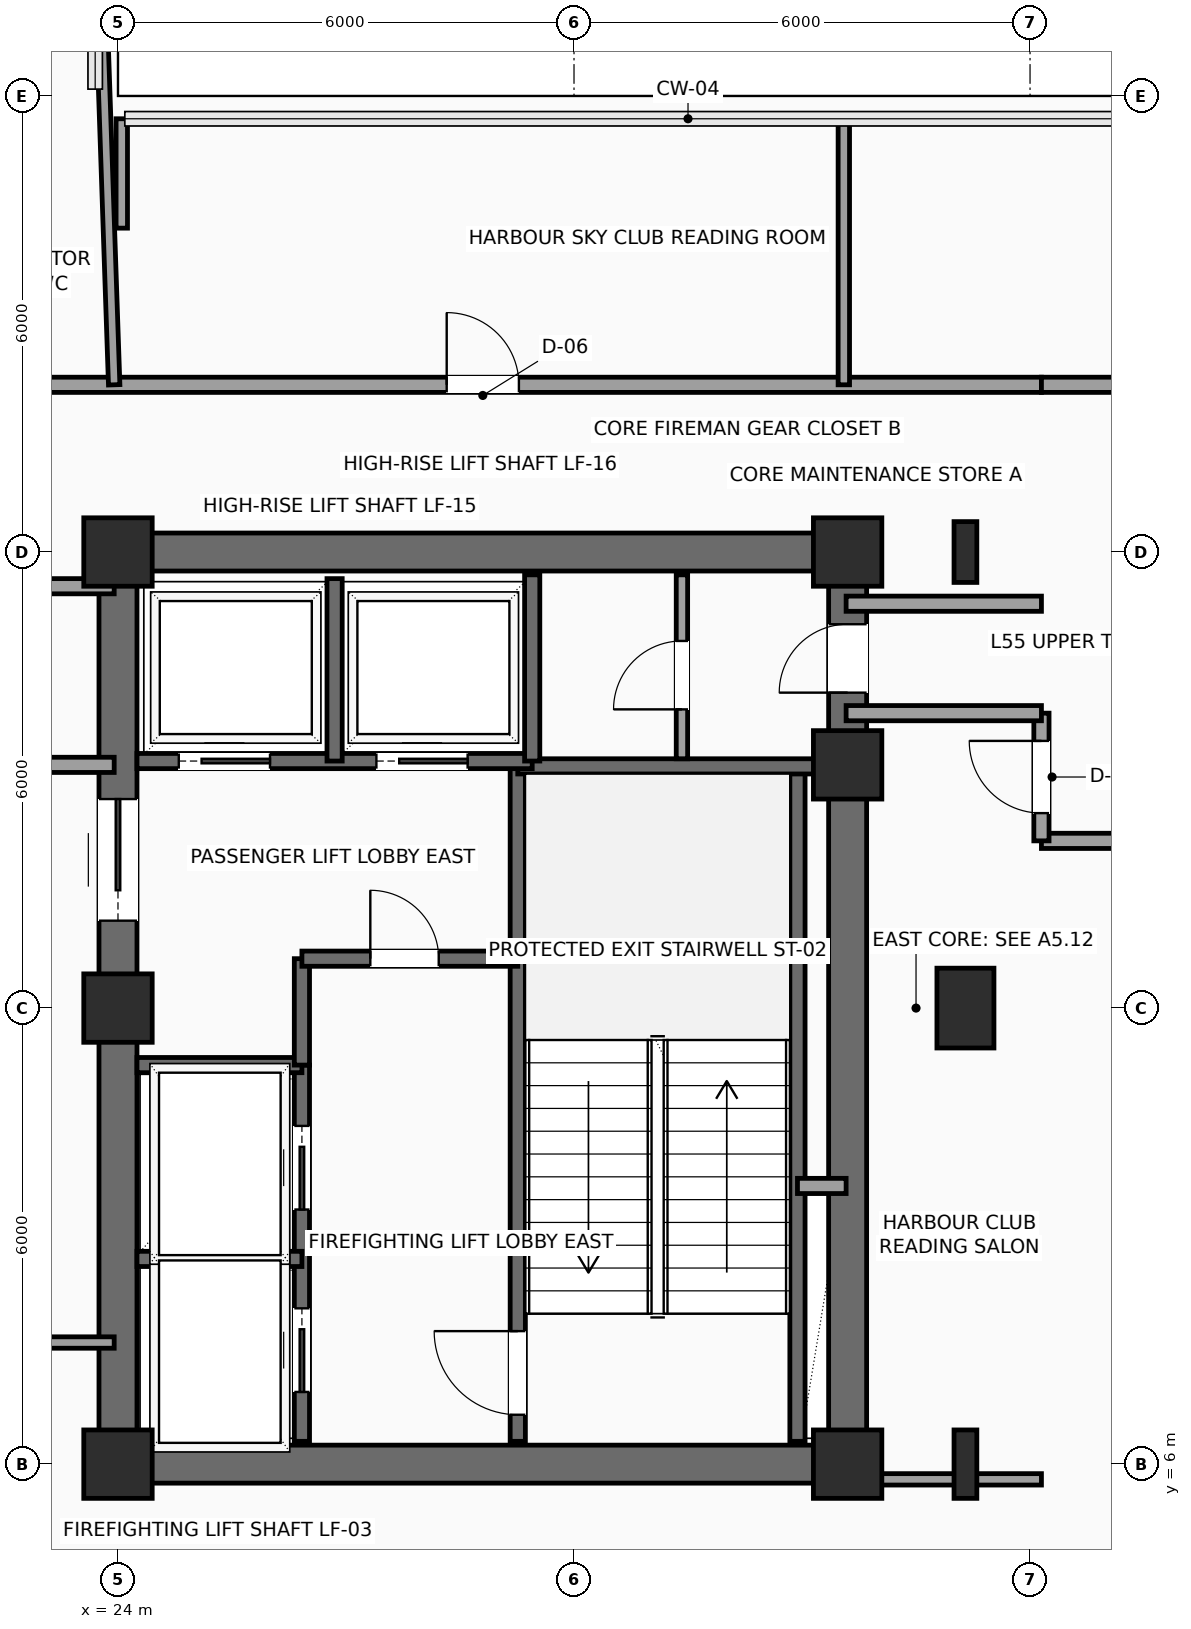
"""IFC4 building model, lengths in metres.
Left out: names, types, materials, properties, quantities, classifications, styles, units other than length and angle.
Written with IfcOpenShell. Run it as: python <this file> out.ifc"""

import sys

from ifc_helpers import new_model, si_unit, direction, frame, frame_2d, origin, origin_2d, place, context, subcontext, project, spatial, rectangle, i_section, extrude, element, fill, save


model = new_model("IFC4")
c1 = context("Model", 3, precision=1e-05, world=origin(), true_north=direction((0.0, 1.0)))
c2 = subcontext(c1, "Body", "Model", "MODEL_VIEW")
j1 = project(units=[si_unit("LENGTHUNIT", "METRE"), si_unit("PLANEANGLEUNIT", "RADIAN")], contexts=[c1])
p1 = place(None, origin())
s1 = spatial("IfcSite", under=j1, at=p1, CompositionType="ELEMENT")
p2 = place(p1, origin())
s2 = spatial("IfcBuilding", under=s1, at=p2, CompositionType="ELEMENT")
p3 = place(p2, frame((0.0, 0.0, 223.65)))
s3 = spatial("IfcBuildingStorey", under=s2, at=p3, CompositionType="ELEMENT", Elevation=223.65)
for number, where, z_axis, x_axis in (
    (1, (24.0, 6.0, 0.0), (0.0, 0.0, 1.0), (1.0, 0.0, 0.0)),
    (2, (24.0, 12.0, 0.0), (0.0, 0.0, 1.0), (1.0, 0.0, 0.0)),
    (3, (24.0, 18.0, 0.0), (0.0, 0.0, 1.0), (1.0, 0.0, 0.0)),
    (4, (33.6, 6.0, 0.0), (0.0, 0.0, 1.0), (1.0, 0.0, 0.0)),
    (5, (33.6, 15.2, 0.0), (0.0, 0.0, 1.0), (1.0, 0.0, 0.0)),
    (6, (33.6, 18.0, 0.0), (0.0, 0.0, 1.0), (1.0, 0.0, 0.0)),
):
    element("IfcColumn", number, at=place(p3, frame(where, z_axis=z_axis, x_axis=x_axis)), inside=s3, PredefinedType="COLUMN", context=c2, shape_type="SweptSolid", body=[
        extrude(rectangle(XDim=0.9, YDim=0.9, at=origin_2d()), origin(), (0.0, 0.0, 1.0), 3.75),
    ])
p4 = place(p3, frame((35.15, 6.0, 0.0), z_axis=(0.0, 0.0, 1.0), x_axis=(1.0, 0.0, 0.0)))
e7 = element("IfcColumn", 7, at=p4, inside=s3, PredefinedType="COLUMN", context=c2, shape_type="SweptSolid", body=[
    extrude(i_section(OverallWidth=0.3, OverallDepth=0.9, WebThickness=0.019, FlangeThickness=0.035, FilletRadius=0.03, at=origin_2d()), origin(), (0.0, 0.0, 1.0), 3.75),
])
p5 = place(p3, frame((35.15, 12.0, 0.0), z_axis=(0.0, 0.0, 1.0), x_axis=(1.0, 0.0, 0.0)))
e8 = element("IfcColumn", 8, at=p5, inside=s3, PredefinedType="COLUMN", context=c2, shape_type="SweptSolid", body=[
    extrude(rectangle(XDim=0.75, YDim=1.05, at=origin_2d()), origin(), (0.0, 0.0, 1.0), 3.75),
])
p6 = place(p3, frame((35.15, 18.0, 0.0), z_axis=(0.0, 0.0, 1.0), x_axis=(1.0, 0.0, 0.0)))
e9 = element("IfcColumn", 9, at=p6, inside=s3, PredefinedType="COLUMN", context=c2, shape_type="SweptSolid", body=[
    extrude(i_section(OverallWidth=0.3, OverallDepth=0.8, WebThickness=0.018, FlangeThickness=0.033, FilletRadius=0.03, at=origin_2d()), origin(), (0.0, 0.0, 1.0), 3.75),
])
for number, where, z_axis, x_axis in (
    (10, (24.0, 6.0, 0.0), (0.0, 0.0, 1.0), (1.0, 0.0, 0.0)),
    (11, (24.0, 18.0, 0.0), (0.0, 0.0, 1.0), (1.0, 0.0, 0.0)),
):
    element("IfcWall", number, at=place(p3, frame(where, z_axis=z_axis, x_axis=x_axis)), inside=s3, PredefinedType="SHEAR", context=c2, shape_type="SweptSolid", body=[
        extrude(rectangle(XDim=9.6, YDim=0.5, at=frame_2d((4.8, 0.0))), origin(), (0.0, 0.0, 1.0), 3.54),
    ])
p7 = place(p3, frame((24.0, 6.0, 0.0), z_axis=(0.0, 0.0, 1.0), x_axis=(0.0, 1.0, 0.0)))
e12 = element("IfcWall", 12, at=p7, inside=s3, PredefinedType="SHEAR", context=c2, shape_type="SweptSolid", body=[
    extrude(rectangle(XDim=12.0, YDim=0.5, at=frame_2d((6.0, 0.0))), origin(), (0.0, 0.0, 1.0), 3.54),
])
p8 = place(p7, frame((7.15, 0.0, 0.0)))
e13 = element("IfcOpeningElement", 13, at=p8, cuts=e12, PredefinedType="OPENING", context=c2, shape_type="SweptSolid", body=[
    extrude(rectangle(XDim=1.6, YDim=2.3, at=frame_2d((0.8, 1.15))), frame((0.0, 0.26, 0.0), z_axis=(0.0, -1.0, 0.0), x_axis=(1.0, 0.0, 0.0)), (0.0, 0.0, 1.0), 0.52),
])
p9 = place(p3, frame((33.6, 6.0, 0.0), z_axis=(0.0, 0.0, 1.0), x_axis=(0.0, 1.0, 0.0)))
e14 = element("IfcWall", 14, at=p9, inside=s3, PredefinedType="SHEAR", context=c2, shape_type="SweptSolid", body=[
    extrude(rectangle(XDim=12.0, YDim=0.5, at=frame_2d((6.0, 0.0))), origin(), (0.0, 0.0, 1.0), 3.54),
])
p10 = place(p9, frame((10.15, 0.0, 0.0)))
e15 = element("IfcOpeningElement", 15, at=p10, cuts=e14, PredefinedType="OPENING", context=c2, shape_type="SweptSolid", body=[
    extrude(rectangle(XDim=0.9, YDim=2.15, at=frame_2d((0.45, 1.075))), frame((0.0, 0.26, 0.0), z_axis=(0.0, -1.0, 0.0), x_axis=(1.0, 0.0, 0.0)), (0.0, 0.0, 1.0), 0.52),
])
p11 = place(p3, frame((29.26, 6.3, 0.0), z_axis=(0.0, 0.0, 1.0), x_axis=(0.0, 1.0, 0.0)))
e16 = element("IfcWall", 16, at=p11, inside=s3, PredefinedType="SHEAR", context=c2, shape_type="SweptSolid", body=[
    extrude(rectangle(XDim=8.88, YDim=0.2, at=frame_2d((4.44, 0.0))), origin(), (0.0, 0.0, 1.0), 3.54),
])
p12 = place(p11, frame((0.35, 0.0, 0.0)))
e17 = element("IfcOpeningElement", 17, at=p12, cuts=e16, PredefinedType="OPENING", context=c2, shape_type="SweptSolid", body=[
    extrude(rectangle(XDim=1.1, YDim=2.2, at=frame_2d((0.55, 1.1))), frame((0.0, 0.11, 0.0), z_axis=(0.0, -1.0, 0.0), x_axis=(1.0, 0.0, 0.0)), (0.0, 0.0, 1.0), 0.22),
])
p13 = place(p3, frame((32.94, 6.3, 0.0), z_axis=(0.0, 0.0, 1.0), x_axis=(0.0, 1.0, 0.0)))
e18 = element("IfcWall", 18, at=p13, inside=s3, PredefinedType="SHEAR", context=c2, shape_type="SweptSolid", body=[
    extrude(rectangle(XDim=8.88, YDim=0.2, at=frame_2d((4.44, 0.0))), origin(), (0.0, 0.0, 1.0), 3.54),
])
p14 = place(p3, frame((29.26, 15.18, 0.0), z_axis=(0.0, 0.0, 1.0), x_axis=(1.0, 0.0, 0.0)))
e19 = element("IfcWall", 19, at=p14, inside=s3, PredefinedType="SHEAR", context=c2, shape_type="SweptSolid", body=[
    extrude(rectangle(XDim=4.04, YDim=0.2, at=frame_2d((2.02, 0.0))), origin(), (0.0, 0.0, 1.0), 3.54),
])
p15 = place(p3, frame((26.42, 6.3, 0.0), z_axis=(0.0, 0.0, 1.0), x_axis=(0.0, 1.0, 0.0)))
e20 = element("IfcWall", 20, at=p15, inside=s3, PredefinedType="SHEAR", context=c2, shape_type="SweptSolid", body=[
    extrude(rectangle(XDim=4.95, YDim=0.2, at=frame_2d((2.475, 0.0))), origin(), (0.0, 0.0, 1.0), 3.54),
])
p16 = place(p15, frame((0.65, 0.0, 0.0)))
e21 = element("IfcOpeningElement", 21, at=p16, cuts=e20, PredefinedType="OPENING", context=c2, shape_type="SweptSolid", body=[
    extrude(rectangle(XDim=1.1, YDim=2.2, at=frame_2d((0.55, 1.1))), frame((0.0, 0.11, 0.0), z_axis=(0.0, -1.0, 0.0), x_axis=(1.0, 0.0, 0.0)), (0.0, 0.0, 1.0), 0.22),
])
p17 = place(p15, frame((3.05, 0.0, 0.0)))
e22 = element("IfcOpeningElement", 22, at=p17, cuts=e20, PredefinedType="OPENING", context=c2, shape_type="SweptSolid", body=[
    extrude(rectangle(XDim=1.1, YDim=2.2, at=frame_2d((0.55, 1.1))), frame((0.0, 0.11, 0.0), z_axis=(0.0, -1.0, 0.0), x_axis=(1.0, 0.0, 0.0)), (0.0, 0.0, 1.0), 0.22),
])
for number, where, z_axis, x_axis in (
    (23, (24.25, 8.7, 0.0), (0.0, 0.0, 1.0), (1.0, 0.0, 0.0)),
    (24, (24.25, 11.25, 0.0), (0.0, 0.0, 1.0), (1.0, 0.0, 0.0)),
):
    element("IfcWall", number, at=place(p3, frame(where, z_axis=z_axis, x_axis=x_axis)), inside=s3, PredefinedType="SHEAR", context=c2, shape_type="SweptSolid", body=[
        extrude(rectangle(XDim=2.17, YDim=0.2, at=frame_2d((1.085, 0.0))), origin(), (0.0, 0.0, 1.0), 3.54),
    ])
p18 = place(p3, frame((26.42, 11.25, 0.0), z_axis=(0.0, 0.0, 1.0), x_axis=(0.0, 1.0, 0.0)))
e25 = element("IfcWall", 25, at=p18, inside=s3, PredefinedType="SHEAR", context=c2, shape_type="SweptSolid", body=[
    extrude(rectangle(XDim=1.4, YDim=0.2, at=frame_2d((0.7, 0.0))), origin(), (0.0, 0.0, 1.0), 3.54),
])
p19 = place(p3, frame((26.42, 12.65, 0.0), z_axis=(0.0, 0.0, 1.0), x_axis=(1.0, 0.0, 0.0)))
e26 = element("IfcWall", 26, at=p19, inside=s3, PredefinedType="SHEAR", context=c2, shape_type="SweptSolid", body=[
    extrude(rectangle(XDim=2.84, YDim=0.2, at=frame_2d((1.42, 0.0))), origin(), (0.0, 0.0, 1.0), 3.54),
])
p20 = place(p19, frame((0.9, 0.0, 0.0)))
e27 = element("IfcOpeningElement", 27, at=p20, cuts=e26, PredefinedType="OPENING", context=c2, shape_type="SweptSolid", body=[
    extrude(rectangle(XDim=0.9, YDim=2.15, at=frame_2d((0.45, 1.075))), frame((0.0, 0.11, 0.0), z_axis=(0.0, -1.0, 0.0), x_axis=(1.0, 0.0, 0.0)), (0.0, 0.0, 1.0), 0.22),
])
p21 = place(p3, frame((32.94, 9.66, 0.0), z_axis=(0.0, 0.0, 1.0), x_axis=(1.0, 0.0, 0.0)))
e28 = element("IfcWall", 28, at=p21, inside=s3, PredefinedType="SOLIDWALL", context=c2, shape_type="SweptSolid", body=[
    extrude(rectangle(XDim=0.64, YDim=0.2, at=frame_2d((0.32, 0.0))), origin(), (0.0, 0.0, 1.0), 3.54),
])
p22 = place(p3, frame((24.25, 15.25, 0.0), z_axis=(0.0, 0.0, 1.0), x_axis=(1.0, 0.0, 0.0)))
e29 = element("IfcWall", 29, at=p22, inside=s3, PredefinedType="SHEAR", context=c2, shape_type="SweptSolid", body=[
    extrude(rectangle(XDim=5.2, YDim=0.2, at=frame_2d((2.6, 0.0))), origin(), (0.0, 0.0, 1.0), 3.54),
])
p23 = place(p22, frame((0.55, 0.0, 0.0)))
e30 = element("IfcOpeningElement", 30, at=p23, cuts=e29, PredefinedType="OPENING", context=c2, shape_type="SweptSolid", body=[
    extrude(rectangle(XDim=1.2, YDim=2.2, at=frame_2d((0.6, 1.1))), frame((0.0, 0.11, 0.0), z_axis=(0.0, -1.0, 0.0), x_axis=(1.0, 0.0, 0.0)), (0.0, 0.0, 1.0), 0.22),
])
p24 = place(p22, frame((3.15, 0.0, 0.0)))
e31 = element("IfcOpeningElement", 31, at=p24, cuts=e29, PredefinedType="OPENING", context=c2, shape_type="SweptSolid", body=[
    extrude(rectangle(XDim=1.2, YDim=2.2, at=frame_2d((0.6, 1.1))), frame((0.0, 0.11, 0.0), z_axis=(0.0, -1.0, 0.0), x_axis=(1.0, 0.0, 0.0)), (0.0, 0.0, 1.0), 0.22),
])
p25 = place(p3, frame((26.85, 15.25, 0.0), z_axis=(0.0, 0.0, 1.0), x_axis=(0.0, 1.0, 0.0)))
e32 = element("IfcWall", 32, at=p25, inside=s3, PredefinedType="SHEAR", context=c2, shape_type="SweptSolid", body=[
    extrude(rectangle(XDim=2.4, YDim=0.2, at=frame_2d((1.2, 0.0))), origin(), (0.0, 0.0, 1.0), 3.54),
])
p26 = place(p3, frame((29.45, 15.25, 0.0), z_axis=(0.0, 0.0, 1.0), x_axis=(0.0, 1.0, 0.0)))
e33 = element("IfcWall", 33, at=p26, inside=s3, PredefinedType="SHEAR", context=c2, shape_type="SweptSolid", body=[
    extrude(rectangle(XDim=2.45, YDim=0.2, at=frame_2d((1.225, 0.0))), origin(), (0.0, 0.0, 1.0), 3.54),
])
p27 = place(p3, frame((31.42, 15.28, 0.0), z_axis=(0.0, 0.0, 1.0), x_axis=(0.0, 1.0, 0.0)))
e34 = element("IfcWall", 34, at=p27, inside=s3, PredefinedType="PARTITIONING", context=c2, shape_type="SweptSolid", body=[
    extrude(rectangle(XDim=2.42, YDim=0.15, at=frame_2d((1.21, 0.0))), origin(), (0.0, 0.0, 1.0), 3.54),
])
p28 = place(p27, frame((0.65, 0.0, 0.0)))
e35 = element("IfcOpeningElement", 35, at=p28, cuts=e34, PredefinedType="OPENING", context=c2, shape_type="SweptSolid", body=[
    extrude(rectangle(XDim=0.9, YDim=2.15, at=frame_2d((0.45, 1.075))), frame((0.0, 0.085, 0.0), z_axis=(0.0, -1.0, 0.0), x_axis=(1.0, 0.0, 0.0)), (0.0, 0.0, 1.0), 0.17),
])
p29 = place(p3, frame((20.45, 20.2, 0.0), z_axis=(0.0, 0.0, 1.0), x_axis=(1.0, 0.0, 0.0)))
e36 = element("IfcWall", 36, at=p29, inside=s3, PredefinedType="SOLIDWALL", context=c2, shape_type="SweptSolid", body=[
    extrude(rectangle(XDim=15.7, YDim=0.2, at=frame_2d((7.85, 0.0))), origin(), (0.0, 0.0, 1.0), 3.54),
])
p30 = place(p29, frame((7.875, 0.0, 0.0)))
e37 = element("IfcOpeningElement", 37, at=p30, cuts=e36, PredefinedType="OPENING", context=c2, shape_type="SweptSolid", body=[
    extrude(rectangle(XDim=0.95, YDim=2.15, at=frame_2d((0.475, 1.075))), frame((0.0, 0.11, 0.0), z_axis=(0.0, -1.0, 0.0), x_axis=(1.0, 0.0, 0.0)), (0.0, 0.0, 1.0), 0.22),
])
for number, where, z_axis, x_axis in (
    (38, (36.15, 20.2, 0.0), (0.0, 0.0, 1.0), (1.0, 0.0, 0.0)),
    (39, (38.55, 14.2, 0.0), (0.0, 0.0, 1.0), (-1.0, 0.0, 0.0)),
):
    element("IfcWall", number, at=place(p3, frame(where, z_axis=z_axis, x_axis=x_axis)), inside=s3, PredefinedType="SOLIDWALL", context=c2, shape_type="SweptSolid", body=[
        extrude(rectangle(XDim=2.4, YDim=0.2, at=frame_2d((1.2, 0.0))), origin(), (0.0, 0.0, 1.0), 3.54),
    ])
p31 = place(p3, frame((36.15, 14.2, 0.0), z_axis=(0.0, 0.0, 1.0), x_axis=(0.0, 1.0, 0.0)))
e40 = element("IfcWall", 40, at=p31, inside=s3, PredefinedType="SOLIDWALL", context=c2, shape_type="SweptSolid", body=[
    extrude(rectangle(XDim=1.68, YDim=0.2, at=frame_2d((0.84, 0.0))), origin(), (0.0, 0.0, 1.0), 3.54),
])
p32 = place(p31, frame((0.365, 0.0, 0.0)))
e41 = element("IfcOpeningElement", 41, at=p32, cuts=e40, PredefinedType="OPENING", context=c2, shape_type="SweptSolid", body=[
    extrude(rectangle(XDim=0.95, YDim=2.15, at=frame_2d((0.475, 1.075))), frame((0.0, 0.11, 0.0), z_axis=(0.0, -1.0, 0.0), x_axis=(1.0, 0.0, 0.0)), (0.0, 0.0, 1.0), 0.22),
])
for number, where, z_axis, x_axis in (
    (42, (36.15, 15.88, 0.0), (0.0, 0.0, 1.0), (-1.0, 0.0, 0.0)),
    (43, (33.58, 17.32, 0.0), (0.0, 0.0, 1.0), (1.0, 0.0, 0.0)),
):
    element("IfcWall", number, at=place(p3, frame(where, z_axis=z_axis, x_axis=x_axis)), inside=s3, PredefinedType="SOLIDWALL", context=c2, shape_type="SweptSolid", body=[
        extrude(rectangle(XDim=2.57, YDim=0.2, at=frame_2d((1.285, 0.0))), origin(), (0.0, 0.0, 1.0), 3.54),
    ])
p33 = place(p3, frame((20.45, 17.55, 0.0), z_axis=(0.0, 0.0, 1.0), x_axis=(1.0, 0.0, 0.0)))
e44 = element("IfcWall", 44, at=p33, inside=s3, PredefinedType="SOLIDWALL", context=c2, shape_type="SweptSolid", body=[
    extrude(rectangle(XDim=3.5, YDim=0.2, at=frame_2d((1.75, 0.0))), origin(), (0.0, 0.0, 1.0), 3.54),
])
p34 = place(p3, frame((23.95, 15.2, 0.0), z_axis=(0.0, 0.0, 1.0), x_axis=(-1.0, 0.0, 0.0)))
e45 = element("IfcWall", 45, at=p34, inside=s3, PredefinedType="SOLIDWALL", context=c2, shape_type="SweptSolid", body=[
    extrude(rectangle(XDim=9.0, YDim=0.2, at=frame_2d((4.5, 0.0))), origin(), (0.0, 0.0, 1.0), 3.132),
])
p35 = place(p3, frame((23.95, 20.2, 0.0), z_axis=(0.0, 0.0, 1.0), x_axis=(-0.033993495762, 0.999422054112, 0.0)))
e46 = element("IfcWall", 46, at=p35, inside=s3, PredefinedType="PARTITIONING", context=c2, shape_type="SweptSolid", body=[
    extrude(rectangle(XDim=7.354, YDim=0.15, at=frame_2d((3.677, 0.0))), origin(), (0.0, 0.0, 1.0), 3.54),
])
p36 = place(p3, frame((24.05, 22.261, 0.0), z_axis=(0.0, 0.0, 1.0), x_axis=(0.0, 1.0, 0.0)))
e47 = element("IfcWall", 47, at=p36, inside=s3, PredefinedType="PARTITIONING", context=c2, shape_type="SweptSolid", body=[
    extrude(rectangle(XDim=1.439, YDim=0.15, at=frame_2d((0.719, 0.0))), origin(), (0.0, 0.0, 1.0), 3.54),
])
p37 = place(p3, frame((33.55, 20.2, 0.0), z_axis=(0.0, 0.0, 1.0), x_axis=(0.0, 1.0, 0.0)))
e48 = element("IfcWall", 48, at=p37, inside=s3, PredefinedType="PARTITIONING", context=c2, shape_type="SweptSolid", body=[
    extrude(rectangle(XDim=3.5, YDim=0.15, at=frame_2d((1.75, 0.0))), origin(), (0.0, 0.0, 1.0), 3.54),
])
p38 = place(p3, frame((33.65, 5.8, 0.0), z_axis=(0.0, 0.0, 1.0), x_axis=(1.0, 0.0, 0.0)))
e49 = element("IfcWall", 49, at=p38, inside=s3, PredefinedType="PARTITIONING", context=c2, shape_type="SweptSolid", body=[
    extrude(rectangle(XDim=2.5, YDim=0.15, at=frame_2d((1.25, 0.0))), origin(), (0.0, 0.0, 1.0), 3.132),
])
p39 = place(p3, frame((14.95, 7.6, 0.0), z_axis=(0.0, 0.0, 1.0), x_axis=(1.0, 0.0, 0.0)))
e50 = element("IfcWall", 50, at=p39, inside=s3, PredefinedType="PARTITIONING", context=c2, shape_type="SweptSolid", body=[
    extrude(rectangle(XDim=9.0, YDim=0.15, at=frame_2d((4.5, 0.0))), origin(), (0.0, 0.0, 1.0), 3.54),
])
p40 = place(p8, origin())
e51 = element("IfcDoor", 51, at=p40, inside=s3, OperationType="DOUBLE_DOOR_SLIDING", PredefinedType="DOOR", context=c2, shape_type="SweptSolid", body=[
    extrude(rectangle(XDim=1.6, YDim=2.3, at=frame_2d((0.8, 1.15))), frame((0.0, 0.025, 0.0), z_axis=(0.0, -1.0, 0.0), x_axis=(1.0, 0.0, 0.0)), (0.0, 0.0, 1.0), 0.05),
])
fill(e13, e51)
p41 = place(p10, origin())
e52 = element("IfcDoor", 52, at=p41, inside=s3, OperationType="SINGLE_SWING_LEFT", PredefinedType="DOOR", context=c2, shape_type="SweptSolid", body=[
    extrude(rectangle(XDim=0.9, YDim=2.15, at=frame_2d((0.45, 1.075))), frame((0.0, 0.025, 0.0), z_axis=(0.0, -1.0, 0.0), x_axis=(1.0, 0.0, 0.0)), (0.0, 0.0, 1.0), 0.05),
])
fill(e15, e52)
p42 = place(p12, origin())
e53 = element("IfcDoor", 53, at=p42, inside=s3, OperationType="SINGLE_SWING_RIGHT", PredefinedType="DOOR", context=c2, shape_type="SweptSolid", body=[
    extrude(rectangle(XDim=1.1, YDim=2.2, at=frame_2d((0.55, 1.1))), frame((0.0, 0.025, 0.0), z_axis=(0.0, -1.0, 0.0), x_axis=(1.0, 0.0, 0.0)), (0.0, 0.0, 1.0), 0.05),
])
fill(e17, e53)
p43 = place(p16, origin())
e54 = element("IfcDoor", 54, at=p43, inside=s3, OperationType="SLIDING_TO_LEFT", PredefinedType="DOOR", context=c2, shape_type="SweptSolid", body=[
    extrude(rectangle(XDim=1.1, YDim=2.2, at=frame_2d((0.55, 1.1))), frame((0.0, 0.025, 0.0), z_axis=(0.0, -1.0, 0.0), x_axis=(1.0, 0.0, 0.0)), (0.0, 0.0, 1.0), 0.05),
])
fill(e21, e54)
p44 = place(p17, origin())
e55 = element("IfcDoor", 55, at=p44, inside=s3, OperationType="SLIDING_TO_LEFT", PredefinedType="DOOR", context=c2, shape_type="SweptSolid", body=[
    extrude(rectangle(XDim=1.1, YDim=2.2, at=frame_2d((0.55, 1.1))), frame((0.0, 0.025, 0.0), z_axis=(0.0, -1.0, 0.0), x_axis=(1.0, 0.0, 0.0)), (0.0, 0.0, 1.0), 0.05),
])
fill(e22, e55)
p45 = place(p20, origin())
e56 = element("IfcDoor", 56, at=p45, inside=s3, OperationType="SINGLE_SWING_LEFT", PredefinedType="DOOR", context=c2, shape_type="SweptSolid", body=[
    extrude(rectangle(XDim=0.9, YDim=2.15, at=frame_2d((0.45, 1.075))), frame((0.0, 0.025, 0.0), z_axis=(0.0, -1.0, 0.0), x_axis=(1.0, 0.0, 0.0)), (0.0, 0.0, 1.0), 0.05),
])
fill(e27, e56)
p46 = place(p23, origin())
e57 = element("IfcDoor", 57, at=p46, inside=s3, OperationType="SLIDING_TO_RIGHT", PredefinedType="DOOR", context=c2, shape_type="SweptSolid", body=[
    extrude(rectangle(XDim=1.2, YDim=2.2, at=frame_2d((0.6, 1.1))), frame((0.0, 0.025, 0.0), z_axis=(0.0, -1.0, 0.0), x_axis=(1.0, 0.0, 0.0)), (0.0, 0.0, 1.0), 0.05),
])
fill(e30, e57)
p47 = place(p24, origin())
e58 = element("IfcDoor", 58, at=p47, inside=s3, OperationType="SLIDING_TO_RIGHT", PredefinedType="DOOR", context=c2, shape_type="SweptSolid", body=[
    extrude(rectangle(XDim=1.2, YDim=2.2, at=frame_2d((0.6, 1.1))), frame((0.0, 0.025, 0.0), z_axis=(0.0, -1.0, 0.0), x_axis=(1.0, 0.0, 0.0)), (0.0, 0.0, 1.0), 0.05),
])
fill(e31, e58)
p48 = place(p28, origin())
e59 = element("IfcDoor", 59, at=p48, inside=s3, OperationType="SINGLE_SWING_LEFT", PredefinedType="DOOR", context=c2, shape_type="SweptSolid", body=[
    extrude(rectangle(XDim=0.9, YDim=2.15, at=frame_2d((0.45, 1.075))), frame((0.0, 0.025, 0.0), z_axis=(0.0, -1.0, 0.0), x_axis=(1.0, 0.0, 0.0)), (0.0, 0.0, 1.0), 0.05),
])
fill(e35, e59)
p49 = place(p30, origin())
e60 = element("IfcDoor", 60, at=p49, inside=s3, OperationType="SINGLE_SWING_LEFT", PredefinedType="DOOR", context=c2, shape_type="SweptSolid", body=[
    extrude(rectangle(XDim=0.95, YDim=2.15, at=frame_2d((0.475, 1.075))), frame((0.0, 0.025, 0.0), z_axis=(0.0, -1.0, 0.0), x_axis=(1.0, 0.0, 0.0)), (0.0, 0.0, 1.0), 0.05),
])
fill(e37, e60)
p50 = place(p32, origin())
e61 = element("IfcDoor", 61, at=p50, inside=s3, OperationType="SINGLE_SWING_RIGHT", PredefinedType="DOOR", context=c2, shape_type="SweptSolid", body=[
    extrude(rectangle(XDim=0.95, YDim=2.15, at=frame_2d((0.475, 1.075))), frame((0.0, 0.025, 0.0), z_axis=(0.0, -1.0, 0.0), x_axis=(1.0, 0.0, 0.0)), (0.0, 0.0, 1.0), 0.05),
])
fill(e41, e61)
save(model, sys.argv[1])
